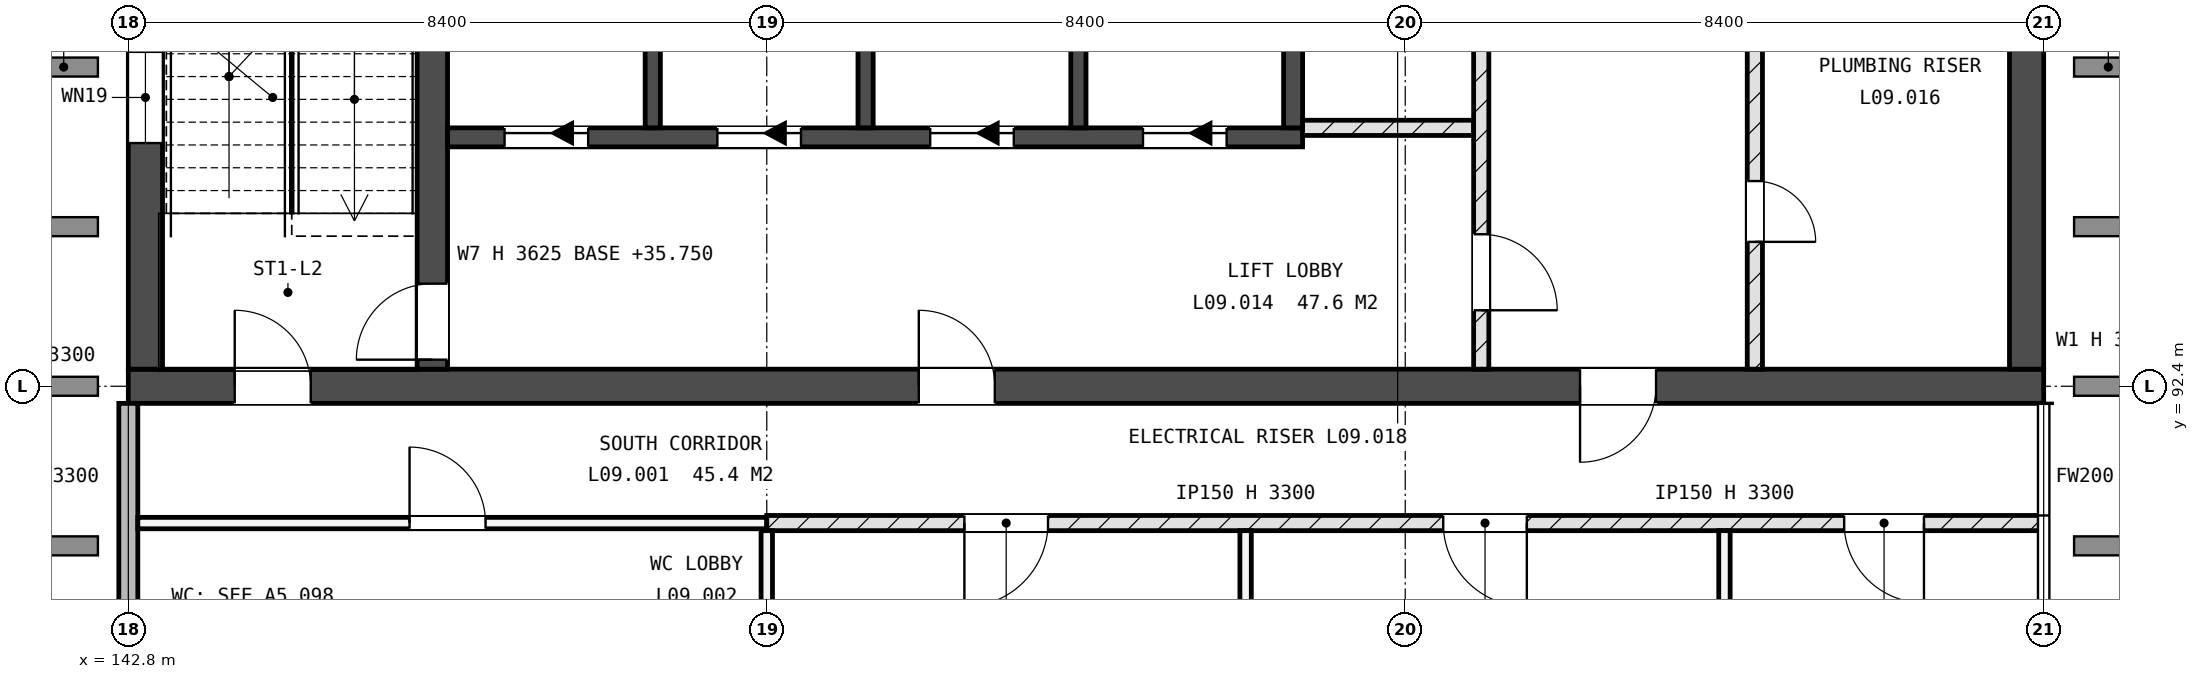
"""IFC4 building model, lengths in metres.
Left out: names, types, materials, properties, quantities, classifications, styles, units other than length and angle.
Written with IfcOpenShell. Run it as: python <this file> out.ifc"""

import sys

from ifc_helpers import new_model, si_unit, direction, frame, frame_2d, origin, place, context, subcontext, project, spatial, rectangle, extrude, element, fill, save


model = new_model("IFC4")
c1 = context("Model", 3, precision=1e-05, world=origin(), true_north=direction((0.0, 1.0)))
c2 = subcontext(c1, "Body", "Model", "MODEL_VIEW")
j1 = project(units=[si_unit("LENGTHUNIT", "METRE"), si_unit("PLANEANGLEUNIT", "RADIAN")], contexts=[c1])
p1 = place(None, origin())
s1 = spatial("IfcSite", under=j1, at=p1, CompositionType="ELEMENT")
p2 = place(p1, origin())
s2 = spatial("IfcBuilding", under=s1, at=p2, CompositionType="ELEMENT")
p3 = place(p2, frame((0.0, 0.0, 36.0)))
s3 = spatial("IfcBuildingStorey", under=s2, at=p3, CompositionType="ELEMENT", Elevation=36.0)
p4 = place(p3, frame((142.8, 92.4, -0.25), z_axis=(0.0, 0.0, 1.0), x_axis=(1.0, 0.0, 0.0)))
e1 = element("IfcWall", 1, at=p4, inside=s3, PredefinedType="SHEAR", context=c2, shape_type="SweptSolid", body=[
    extrude(rectangle(XDim=25.2, YDim=0.45, at=frame_2d((12.6, 0.0))), origin(), (0.0, 0.0, 1.0), 3.625),
])
p5 = place(p4, frame((1.4, 0.0, 0.25)))
e2 = element("IfcOpeningElement", 2, at=p5, cuts=e1, PredefinedType="OPENING", context=c2, shape_type="SweptSolid", body=[
    extrude(rectangle(XDim=1.0, YDim=2.1, at=frame_2d((0.5, 1.05))), frame((0.0, 0.235, 0.0), z_axis=(0.0, -1.0, 0.0), x_axis=(1.0, 0.0, 0.0)), (0.0, 0.0, 1.0), 0.47),
])
p6 = place(p4, frame((19.1, 0.0, 0.25)))
e3 = element("IfcOpeningElement", 3, at=p6, cuts=e1, PredefinedType="OPENING", context=c2, shape_type="SweptSolid", body=[
    extrude(rectangle(XDim=1.0, YDim=2.1, at=frame_2d((0.5, 1.05))), frame((0.0, 0.235, 0.0), z_axis=(0.0, -1.0, 0.0), x_axis=(1.0, 0.0, 0.0)), (0.0, 0.0, 1.0), 0.47),
])
p7 = place(p4, frame((10.4, 0.0, 0.25)))
e4 = element("IfcOpeningElement", 4, at=p7, cuts=e1, PredefinedType="OPENING", context=c2, shape_type="SweptSolid", body=[
    extrude(rectangle(XDim=1.0, YDim=2.1, at=frame_2d((0.5, 1.05))), frame((0.0, 0.235, 0.0), z_axis=(0.0, -1.0, 0.0), x_axis=(1.0, 0.0, 0.0)), (0.0, 0.0, 1.0), 0.47),
])
p8 = place(p3, frame((143.025, 92.625, -0.25), z_axis=(0.0, 0.0, 1.0), x_axis=(0.0, 1.0, 0.0)))
e5 = element("IfcWall", 5, at=p8, inside=s3, PredefinedType="SHEAR", context=c2, shape_type="SweptSolid", body=[
    extrude(rectangle(XDim=16.35, YDim=0.45, at=frame_2d((8.175, 0.0))), origin(), (0.0, 0.0, 1.0), 3.625),
])
p9 = place(p8, frame((2.975, 0.0, 1.85)))
e6 = element("IfcOpeningElement", 6, at=p9, cuts=e5, PredefinedType="OPENING", context=c2, shape_type="SweptSolid", body=[
    extrude(rectangle(XDim=1.2, YDim=0.9, at=frame_2d((0.6, 0.45))), frame((0.0, 0.235, 0.0), z_axis=(0.0, -1.0, 0.0), x_axis=(1.0, 0.0, 0.0)), (0.0, 0.0, 1.0), 0.47),
])
p10 = place(p3, frame((167.775, 92.625, -0.25), z_axis=(0.0, 0.0, 1.0), x_axis=(0.0, 1.0, 0.0)))
e7 = element("IfcWall", 7, at=p10, inside=s3, PredefinedType="SHEAR", context=c2, shape_type="SweptSolid", body=[
    extrude(rectangle(XDim=16.35, YDim=0.45, at=frame_2d((8.175, 0.0))), origin(), (0.0, 0.0, 1.0), 3.625),
])
p11 = place(p10, frame((12.175, 0.0, 1.85)))
e8 = element("IfcOpeningElement", 8, at=p11, cuts=e7, PredefinedType="OPENING", context=c2, shape_type="SweptSolid", body=[
    extrude(rectangle(XDim=1.2, YDim=0.9, at=frame_2d((0.6, 0.45))), frame((0.0, 0.235, 0.0), z_axis=(0.0, -1.0, 0.0), x_axis=(1.0, 0.0, 0.0)), (0.0, 0.0, 1.0), 0.47),
])
p12 = place(p3, frame((146.8, 92.625, -0.25), z_axis=(0.0, 0.0, 1.0), x_axis=(0.0, 1.0, 0.0)))
e9 = element("IfcWall", 9, at=p12, inside=s3, PredefinedType="SHEAR", context=c2, shape_type="SweptSolid", body=[
    extrude(rectangle(XDim=7.5, YDim=0.4, at=frame_2d((3.75, 0.0))), origin(), (0.0, 0.0, 1.0), 3.625),
])
p13 = place(p12, frame((0.125, 0.0, 0.25)))
e10 = element("IfcOpeningElement", 10, at=p13, cuts=e9, PredefinedType="OPENING", context=c2, shape_type="SweptSolid", body=[
    extrude(rectangle(XDim=1.0, YDim=2.1, at=frame_2d((0.5, 1.05))), frame((0.0, 0.21, 0.0), z_axis=(0.0, -1.0, 0.0), x_axis=(1.0, 0.0, 0.0)), (0.0, 0.0, 1.0), 0.42),
])
p14 = place(p3, frame((147.0, 95.675, -0.25), z_axis=(0.0, 0.0, 1.0), x_axis=(1.0, 0.0, 0.0)))
e11 = element("IfcWall", 11, at=p14, inside=s3, PredefinedType="SHEAR", context=c2, shape_type="SweptSolid", body=[
    extrude(rectangle(XDim=11.25, YDim=0.25, at=frame_2d((5.625, 0.0))), origin(), (0.0, 0.0, 1.0), 3.625),
])
p15 = place(p14, frame((0.75, 0.0, 0.25)))
e12 = element("IfcOpeningElement", 12, at=p15, cuts=e11, PredefinedType="OPENING", context=c2, shape_type="SweptSolid", body=[
    extrude(rectangle(XDim=1.1, YDim=2.1, at=frame_2d((0.55, 1.05))), frame((0.0, 0.135, 0.0), z_axis=(0.0, -1.0, 0.0), x_axis=(1.0, 0.0, 0.0)), (0.0, 0.0, 1.0), 0.27),
])
p16 = place(p14, frame((3.55, 0.0, 0.25)))
e13 = element("IfcOpeningElement", 13, at=p16, cuts=e11, PredefinedType="OPENING", context=c2, shape_type="SweptSolid", body=[
    extrude(rectangle(XDim=1.1, YDim=2.1, at=frame_2d((0.55, 1.05))), frame((0.0, 0.135, 0.0), z_axis=(0.0, -1.0, 0.0), x_axis=(1.0, 0.0, 0.0)), (0.0, 0.0, 1.0), 0.27),
])
p17 = place(p14, frame((6.35, 0.0, 0.25)))
e14 = element("IfcOpeningElement", 14, at=p17, cuts=e11, PredefinedType="OPENING", context=c2, shape_type="SweptSolid", body=[
    extrude(rectangle(XDim=1.1, YDim=2.1, at=frame_2d((0.55, 1.05))), frame((0.0, 0.135, 0.0), z_axis=(0.0, -1.0, 0.0), x_axis=(1.0, 0.0, 0.0)), (0.0, 0.0, 1.0), 0.27),
])
p18 = place(p14, frame((9.15, 0.0, 0.25)))
e15 = element("IfcOpeningElement", 15, at=p18, cuts=e11, PredefinedType="OPENING", context=c2, shape_type="SweptSolid", body=[
    extrude(rectangle(XDim=1.1, YDim=2.1, at=frame_2d((0.55, 1.05))), frame((0.0, 0.135, 0.0), z_axis=(0.0, -1.0, 0.0), x_axis=(1.0, 0.0, 0.0)), (0.0, 0.0, 1.0), 0.27),
])
p19 = place(p3, frame((158.125, 95.8, -0.25), z_axis=(0.0, 0.0, 1.0), x_axis=(0.0, 1.0, 0.0)))
e16 = element("IfcWall", 16, at=p19, inside=s3, PredefinedType="SHEAR", context=c2, shape_type="SweptSolid", body=[
    extrude(rectangle(XDim=2.9, YDim=0.25, at=frame_2d((1.45, 0.0))), origin(), (0.0, 0.0, 1.0), 3.625),
])
for number, where, z_axis, x_axis in (
    (17, (149.7, 95.8, -0.25), (0.0, 0.0, 1.0), (0.0, 1.0, 0.0)),
    (18, (152.5, 95.8, -0.25), (0.0, 0.0, 1.0), (0.0, 1.0, 0.0)),
    (19, (155.3, 95.8, -0.25), (0.0, 0.0, 1.0), (0.0, 1.0, 0.0)),
):
    element("IfcWall", number, at=place(p3, frame(where, z_axis=z_axis, x_axis=x_axis)), inside=s3, PredefinedType="SHEAR", context=c2, shape_type="SweptSolid", body=[
        extrude(rectangle(XDim=2.9, YDim=0.2, at=frame_2d((1.45, 0.0))), origin(), (0.0, 0.0, 1.0), 3.625),
    ])
p20 = place(p3, frame((142.8, 84.4, 0.0), z_axis=(0.0, 0.0, 1.0), x_axis=(0.0, 1.0, 0.0)))
e20 = element("IfcWall", 20, at=p20, inside=s3, PredefinedType="STANDARD", context=c2, shape_type="SweptSolid", body=[
    extrude(rectangle(XDim=7.775, YDim=0.25, at=frame_2d((3.888, 0.0))), origin(), (0.0, 0.0, 1.0), 3.3),
])
p21 = place(p20, frame((2.3, 0.0, 2.1)))
e21 = element("IfcOpeningElement", 21, at=p21, cuts=e20, PredefinedType="OPENING", context=c2, shape_type="SweptSolid", body=[
    extrude(rectangle(XDim=0.9, YDim=0.6, at=frame_2d((0.45, 0.3))), frame((0.0, 0.135, 0.0), z_axis=(0.0, -1.0, 0.0), x_axis=(1.0, 0.0, 0.0)), (0.0, 0.0, 1.0), 0.27),
])
p22 = place(p3, frame((142.925, 90.6, 0.0), z_axis=(0.0, 0.0, 1.0), x_axis=(1.0, 0.0, 0.0)))
e22 = element("IfcWall", 22, at=p22, inside=s3, PredefinedType="PARTITIONING", context=c2, shape_type="SweptSolid", body=[
    extrude(rectangle(XDim=8.275, YDim=0.15, at=frame_2d((4.137, 0.0))), origin(), (0.0, 0.0, 1.0), 3.3),
])
p23 = place(p22, frame((3.575, 0.0, 0.0)))
e23 = element("IfcOpeningElement", 23, at=p23, cuts=e22, PredefinedType="OPENING", context=c2, shape_type="SweptSolid", body=[
    extrude(rectangle(XDim=1.0, YDim=2.1, at=frame_2d((0.5, 1.05))), frame((0.0, 0.085, 0.0), z_axis=(0.0, -1.0, 0.0), x_axis=(1.0, 0.0, 0.0)), (0.0, 0.0, 1.0), 0.17),
])
p24 = place(p3, frame((151.2, 90.6, 0.0), z_axis=(0.0, 0.0, 1.0), x_axis=(1.0, 0.0, 0.0)))
e24 = element("IfcWall", 24, at=p24, inside=s3, PredefinedType="SOLIDWALL", context=c2, shape_type="SweptSolid", body=[
    extrude(rectangle(XDim=16.8, YDim=0.2, at=frame_2d((8.4, 0.0))), origin(), (0.0, 0.0, 1.0), 3.3),
])
p25 = place(p24, frame((2.6, 0.0, 0.0)))
e25 = element("IfcOpeningElement", 25, at=p25, cuts=e24, PredefinedType="OPENING", context=c2, shape_type="SweptSolid", body=[
    extrude(rectangle(XDim=1.1, YDim=2.25, at=frame_2d((0.55, 1.125))), frame((0.0, 0.11, 0.0), z_axis=(0.0, -1.0, 0.0), x_axis=(1.0, 0.0, 0.0)), (0.0, 0.0, 1.0), 0.22),
])
p26 = place(p24, frame((8.9, 0.0, 0.0)))
e26 = element("IfcOpeningElement", 26, at=p26, cuts=e24, PredefinedType="OPENING", context=c2, shape_type="SweptSolid", body=[
    extrude(rectangle(XDim=1.1, YDim=2.25, at=frame_2d((0.55, 1.125))), frame((0.0, 0.11, 0.0), z_axis=(0.0, -1.0, 0.0), x_axis=(1.0, 0.0, 0.0)), (0.0, 0.0, 1.0), 0.22),
])
p27 = place(p24, frame((14.175, 0.0, 0.0)))
e27 = element("IfcOpeningElement", 27, at=p27, cuts=e24, PredefinedType="OPENING", context=c2, shape_type="SweptSolid", body=[
    extrude(rectangle(XDim=1.05, YDim=2.1, at=frame_2d((0.525, 1.05))), frame((0.0, 0.11, 0.0), z_axis=(0.0, -1.0, 0.0), x_axis=(1.0, 0.0, 0.0)), (0.0, 0.0, 1.0), 0.22),
])
p28 = place(p3, frame((158.25, 95.8, 0.0), z_axis=(0.0, 0.0, 1.0), x_axis=(1.0, 0.0, 0.0)))
e28 = element("IfcWall", 28, at=p28, inside=s3, PredefinedType="SOLIDWALL", context=c2, shape_type="SweptSolid", body=[
    extrude(rectangle(XDim=2.25, YDim=0.2, at=frame_2d((1.125, 0.0))), origin(), (0.0, 0.0, 1.0), 3.3),
])
p29 = place(p3, frame((151.2, 84.0, 0.0), z_axis=(0.0, 0.0, 1.0), x_axis=(0.0, 1.0, 0.0)))
e29 = element("IfcWall", 29, at=p29, inside=s3, PredefinedType="PARTITIONING", context=c2, shape_type="SweptSolid", body=[
    extrude(rectangle(XDim=6.5, YDim=0.15, at=frame_2d((3.25, 0.0))), origin(), (0.0, 0.0, 1.0), 2.625),
])
p30 = place(p3, frame((157.5, 84.0, 0.0), z_axis=(0.0, 0.0, 1.0), x_axis=(0.0, 1.0, 0.0)))
e30 = element("IfcWall", 30, at=p30, inside=s3, PredefinedType="PARTITIONING", context=c2, shape_type="SweptSolid", body=[
    extrude(rectangle(XDim=6.5, YDim=0.15, at=frame_2d((3.25, 0.0))), origin(), (0.0, 0.0, 1.0), 3.3),
])
p31 = place(p3, frame((160.6, 92.625, 0.0), z_axis=(0.0, 0.0, 1.0), x_axis=(0.0, 1.0, 0.0)))
e31 = element("IfcWall", 31, at=p31, inside=s3, PredefinedType="SOLIDWALL", context=c2, shape_type="SweptSolid", body=[
    extrude(rectangle(XDim=12.475, YDim=0.2, at=frame_2d((6.238, 0.0))), origin(), (0.0, 0.0, 1.0), 3.3),
])
p32 = place(p31, frame((5.075, 0.0, 0.0)))
e32 = element("IfcOpeningElement", 32, at=p32, cuts=e31, PredefinedType="OPENING", context=c2, shape_type="SweptSolid", body=[
    extrude(rectangle(XDim=0.8, YDim=2.1, at=frame_2d((0.4, 1.05))), frame((0.0, 0.11, 0.0), z_axis=(0.0, -1.0, 0.0), x_axis=(1.0, 0.0, 0.0)), (0.0, 0.0, 1.0), 0.22),
])
p33 = place(p31, frame((0.775, 0.0, 0.0)))
e33 = element("IfcOpeningElement", 33, at=p33, cuts=e31, PredefinedType="OPENING", context=c2, shape_type="SweptSolid", body=[
    extrude(rectangle(XDim=1.0, YDim=2.1, at=frame_2d((0.5, 1.05))), frame((0.0, 0.11, 0.0), z_axis=(0.0, -1.0, 0.0), x_axis=(1.0, 0.0, 0.0)), (0.0, 0.0, 1.0), 0.22),
])
p34 = place(p3, frame((163.8, 84.0, 0.0), z_axis=(0.0, 0.0, 1.0), x_axis=(0.0, 1.0, 0.0)))
e34 = element("IfcWall", 34, at=p34, inside=s3, PredefinedType="PARTITIONING", context=c2, shape_type="SweptSolid", body=[
    extrude(rectangle(XDim=6.5, YDim=0.15, at=frame_2d((3.25, 0.0))), origin(), (0.0, 0.0, 1.0), 3.3),
])
p35 = place(p3, frame((164.2, 92.625, 0.0), z_axis=(0.0, 0.0, 1.0), x_axis=(0.0, 1.0, 0.0)))
e35 = element("IfcWall", 35, at=p35, inside=s3, PredefinedType="SOLIDWALL", context=c2, shape_type="SweptSolid", body=[
    extrude(rectangle(XDim=8.725, YDim=0.2, at=frame_2d((4.363, 0.0))), origin(), (0.0, 0.0, 1.0), 3.3),
])
p36 = place(p35, frame((1.675, 0.0, 0.0)))
e36 = element("IfcOpeningElement", 36, at=p36, cuts=e35, PredefinedType="OPENING", context=c2, shape_type="SweptSolid", body=[
    extrude(rectangle(XDim=0.8, YDim=2.1, at=frame_2d((0.4, 1.05))), frame((0.0, 0.11, 0.0), z_axis=(0.0, -1.0, 0.0), x_axis=(1.0, 0.0, 0.0)), (0.0, 0.0, 1.0), 0.22),
])
p37 = place(p35, frame((6.275, 0.0, 0.0)))
e37 = element("IfcOpeningElement", 37, at=p37, cuts=e35, PredefinedType="OPENING", context=c2, shape_type="SweptSolid", body=[
    extrude(rectangle(XDim=0.8, YDim=2.1, at=frame_2d((0.4, 1.05))), frame((0.0, 0.11, 0.0), z_axis=(0.0, -1.0, 0.0), x_axis=(1.0, 0.0, 0.0)), (0.0, 0.0, 1.0), 0.22),
])
p38 = place(p9, origin())
e38 = element("IfcWindow", 38, at=p38, inside=s3, PartitioningType="SINGLE_PANEL", PredefinedType="WINDOW", context=c2, shape_type="SweptSolid", body=[
    extrude(rectangle(XDim=1.2, YDim=0.9, at=frame_2d((0.6, 0.45))), frame((0.0, 0.03, 0.0), z_axis=(0.0, -1.0, 0.0), x_axis=(1.0, 0.0, 0.0)), (0.0, 0.0, 1.0), 0.06),
])
fill(e6, e38)
p39 = place(p15, origin())
e39 = element("IfcDoor", 39, at=p39, inside=s3, OperationType="SLIDING_TO_LEFT", PredefinedType="DOOR", context=c2, shape_type="SweptSolid", body=[
    extrude(rectangle(XDim=1.1, YDim=2.1, at=frame_2d((0.55, 1.05))), frame((0.0, 0.025, 0.0), z_axis=(0.0, -1.0, 0.0), x_axis=(1.0, 0.0, 0.0)), (0.0, 0.0, 1.0), 0.05),
])
fill(e12, e39)
p40 = place(p16, origin())
e40 = element("IfcDoor", 40, at=p40, inside=s3, OperationType="SLIDING_TO_LEFT", PredefinedType="DOOR", context=c2, shape_type="SweptSolid", body=[
    extrude(rectangle(XDim=1.1, YDim=2.1, at=frame_2d((0.55, 1.05))), frame((0.0, 0.025, 0.0), z_axis=(0.0, -1.0, 0.0), x_axis=(1.0, 0.0, 0.0)), (0.0, 0.0, 1.0), 0.05),
])
fill(e13, e40)
p41 = place(p17, origin())
e41 = element("IfcDoor", 41, at=p41, inside=s3, OperationType="SLIDING_TO_LEFT", PredefinedType="DOOR", context=c2, shape_type="SweptSolid", body=[
    extrude(rectangle(XDim=1.1, YDim=2.1, at=frame_2d((0.55, 1.05))), frame((0.0, 0.025, 0.0), z_axis=(0.0, -1.0, 0.0), x_axis=(1.0, 0.0, 0.0)), (0.0, 0.0, 1.0), 0.05),
])
fill(e14, e41)
p42 = place(p18, origin())
e42 = element("IfcDoor", 42, at=p42, inside=s3, OperationType="SLIDING_TO_LEFT", PredefinedType="DOOR", context=c2, shape_type="SweptSolid", body=[
    extrude(rectangle(XDim=1.1, YDim=2.1, at=frame_2d((0.55, 1.05))), frame((0.0, 0.025, 0.0), z_axis=(0.0, -1.0, 0.0), x_axis=(1.0, 0.0, 0.0)), (0.0, 0.0, 1.0), 0.05),
])
fill(e15, e42)
p43 = place(p5, origin())
e43 = element("IfcDoor", 43, at=p43, inside=s3, OperationType="SINGLE_SWING_RIGHT", PredefinedType="DOOR", context=c2, shape_type="SweptSolid", body=[
    extrude(rectangle(XDim=1.0, YDim=2.1, at=frame_2d((0.5, 1.05))), frame((0.0, 0.025, 0.0), z_axis=(0.0, -1.0, 0.0), x_axis=(1.0, 0.0, 0.0)), (0.0, 0.0, 1.0), 0.05),
])
fill(e2, e43)
p44 = place(p13, origin())
e44 = element("IfcDoor", 44, at=p44, inside=s3, OperationType="SINGLE_SWING_RIGHT", PredefinedType="DOOR", context=c2, shape_type="SweptSolid", body=[
    extrude(rectangle(XDim=1.0, YDim=2.1, at=frame_2d((0.5, 1.05))), frame((0.0, 0.025, 0.0), z_axis=(0.0, -1.0, 0.0), x_axis=(1.0, 0.0, 0.0)), (0.0, 0.0, 1.0), 0.05),
])
fill(e10, e44)
p45 = place(p25, origin())
e45 = element("IfcDoor", 45, at=p45, inside=s3, OperationType="SINGLE_SWING_LEFT", PredefinedType="DOOR", context=c2, shape_type="SweptSolid", body=[
    extrude(rectangle(XDim=1.1, YDim=2.25, at=frame_2d((0.55, 1.125))), frame((0.0, 0.025, 0.0), z_axis=(0.0, -1.0, 0.0), x_axis=(1.0, 0.0, 0.0)), (0.0, 0.0, 1.0), 0.05),
])
fill(e25, e45)
p46 = place(p26, origin())
e46 = element("IfcDoor", 46, at=p46, inside=s3, OperationType="SINGLE_SWING_RIGHT", PredefinedType="DOOR", context=c2, shape_type="SweptSolid", body=[
    extrude(rectangle(XDim=1.1, YDim=2.25, at=frame_2d((0.55, 1.125))), frame((0.0, 0.025, 0.0), z_axis=(0.0, -1.0, 0.0), x_axis=(1.0, 0.0, 0.0)), (0.0, 0.0, 1.0), 0.05),
])
fill(e26, e46)
p47 = place(p27, origin())
e47 = element("IfcDoor", 47, at=p47, inside=s3, OperationType="SINGLE_SWING_RIGHT", PredefinedType="DOOR", context=c2, shape_type="SweptSolid", body=[
    extrude(rectangle(XDim=1.05, YDim=2.1, at=frame_2d((0.525, 1.05))), frame((0.0, 0.025, 0.0), z_axis=(0.0, -1.0, 0.0), x_axis=(1.0, 0.0, 0.0)), (0.0, 0.0, 1.0), 0.05),
])
fill(e27, e47)
p48 = place(p36, origin())
e48 = element("IfcDoor", 48, at=p48, inside=s3, OperationType="SINGLE_SWING_LEFT", PredefinedType="DOOR", context=c2, shape_type="SweptSolid", body=[
    extrude(rectangle(XDim=0.8, YDim=2.1, at=frame_2d((0.4, 1.05))), frame((0.0, 0.025, 0.0), z_axis=(0.0, -1.0, 0.0), x_axis=(1.0, 0.0, 0.0)), (0.0, 0.0, 1.0), 0.05),
])
fill(e36, e48)
p49 = place(p23, origin())
e49 = element("IfcDoor", 49, at=p49, inside=s3, OperationType="SINGLE_SWING_RIGHT", PredefinedType="DOOR", context=c2, shape_type="SweptSolid", body=[
    extrude(rectangle(XDim=1.0, YDim=2.1, at=frame_2d((0.5, 1.05))), frame((0.0, 0.025, 0.0), z_axis=(0.0, -1.0, 0.0), x_axis=(1.0, 0.0, 0.0)), (0.0, 0.0, 1.0), 0.05),
])
fill(e23, e49)
p50 = place(p6, origin())
e50 = element("IfcDoor", 50, at=p50, inside=s3, OperationType="SINGLE_SWING_LEFT", PredefinedType="DOOR", context=c2, shape_type="SweptSolid", body=[
    extrude(rectangle(XDim=1.0, YDim=2.1, at=frame_2d((0.5, 1.05))), frame((0.0, 0.025, 0.0), z_axis=(0.0, -1.0, 0.0), x_axis=(1.0, 0.0, 0.0)), (0.0, 0.0, 1.0), 0.05),
])
fill(e3, e50)
p51 = place(p7, origin())
e51 = element("IfcDoor", 51, at=p51, inside=s3, OperationType="SINGLE_SWING_RIGHT", PredefinedType="DOOR", context=c2, shape_type="SweptSolid", body=[
    extrude(rectangle(XDim=1.0, YDim=2.1, at=frame_2d((0.5, 1.05))), frame((0.0, 0.025, 0.0), z_axis=(0.0, -1.0, 0.0), x_axis=(1.0, 0.0, 0.0)), (0.0, 0.0, 1.0), 0.05),
])
fill(e4, e51)
p52 = place(p33, origin())
e52 = element("IfcDoor", 52, at=p52, inside=s3, OperationType="SINGLE_SWING_LEFT", PredefinedType="DOOR", context=c2, shape_type="SweptSolid", body=[
    extrude(rectangle(XDim=1.0, YDim=2.1, at=frame_2d((0.5, 1.05))), frame((0.0, 0.025, 0.0), z_axis=(0.0, -1.0, 0.0), x_axis=(1.0, 0.0, 0.0)), (0.0, 0.0, 1.0), 0.05),
])
fill(e33, e52)
save(model, sys.argv[1])
